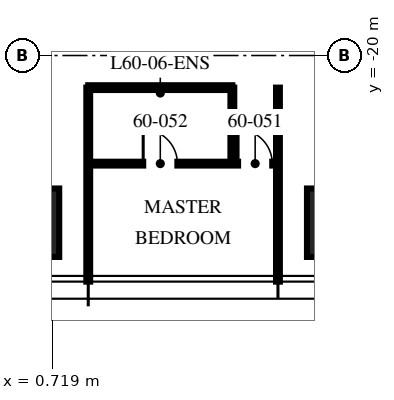
"""IFC4 building model, lengths in metres.
Left out: names, types, materials, properties, quantities, classifications, styles, units other than length and angle.
Written with IfcOpenShell. Run it as: python <this file> out.ifc"""

import sys

from ifc_helpers import new_model, si_unit, direction, frame, frame_2d, origin, origin_2d, place, context, subcontext, project, spatial, rectangle, extrude, element, fill, save


model = new_model("IFC4")
c1 = context("Model", 3, precision=1e-05, world=origin(), true_north=direction((0.0, 1.0)))
c2 = subcontext(c1, "Body", "Model", "MODEL_VIEW")
j1 = project(units=[si_unit("LENGTHUNIT", "METRE"), si_unit("PLANEANGLEUNIT", "RADIAN")], contexts=[c1])
p1 = place(None, origin())
s1 = spatial("IfcSite", under=j1, at=p1, CompositionType="ELEMENT")
p2 = place(p1, origin())
s2 = spatial("IfcBuilding", under=s1, at=p2, CompositionType="ELEMENT")
p3 = place(p2, frame((0.0, 0.0, 240.75)))
s3 = spatial("IfcBuildingStorey", under=s2, at=p3, CompositionType="ELEMENT", Elevation=240.75)
for number, where, z_axis, x_axis in (
    (1, (8.32, -24.4, 0.0), (0.0, 0.0, 1.0), (1.0, 0.0, 0.0)),
    (2, (0.0, -24.4, 0.0), (0.0, 0.0, 1.0), (1.0, 0.0, 0.0)),
):
    element("IfcColumn", number, at=place(p3, frame(where, z_axis=z_axis, x_axis=x_axis)), inside=s3, PredefinedType="COLUMN", context=c2, shape_type="SweptSolid", body=[
        extrude(rectangle(XDim=1.8, YDim=1.8, at=origin_2d()), origin(), (0.0, 0.0, 1.0), 3.75),
    ])
for number, where, z_axis, x_axis in (
    (3, (1.664, -20.845, 0.0), (0.0, 0.0, 1.0), (0.0, -1.0, 0.0)),
    (4, (6.656, -20.845, 0.0), (0.0, 0.0, 1.0), (0.0, -1.0, 0.0)),
):
    element("IfcWall", number, at=place(p3, frame(where, z_axis=z_axis, x_axis=x_axis)), inside=s3, PredefinedType="PARTITIONING", context=c2, shape_type="SweptSolid", body=[
        extrude(rectangle(XDim=5.105, YDim=0.1, at=frame_2d((2.552, 0.0))), origin(), (0.0, 0.0, 1.0), 2.91),
    ])
p4 = place(p3, frame((1.664, -22.845, 0.0), z_axis=(0.0, 0.0, 1.0), x_axis=(1.0, 0.0, 0.0)))
e5 = element("IfcWall", 5, at=p4, inside=s3, PredefinedType="PARTITIONING", context=c2, shape_type="SweptSolid", body=[
    extrude(rectangle(XDim=4.992, YDim=0.1, at=frame_2d((2.496, 0.0))), origin(), (0.0, 0.0, 1.0), 2.81),
])
p5 = place(p4, frame((3.942, 0.0, 0.0)))
e6 = element("IfcOpeningElement", 6, at=p5, cuts=e5, PredefinedType="OPENING", context=c2, shape_type="SweptSolid", body=[
    extrude(rectangle(XDim=0.9, YDim=2.1, at=frame_2d((0.45, 1.05))), frame((0.0, 0.06, 0.0), z_axis=(0.0, -1.0, 0.0), x_axis=(1.0, 0.0, 0.0)), (0.0, 0.0, 1.0), 0.12),
])
p6 = place(p4, frame((1.446, 0.0, 0.0)))
e7 = element("IfcOpeningElement", 7, at=p6, cuts=e5, PredefinedType="OPENING", context=c2, shape_type="SweptSolid", body=[
    extrude(rectangle(XDim=0.9, YDim=2.1, at=frame_2d((0.45, 1.05))), frame((0.0, 0.06, 0.0), z_axis=(0.0, -1.0, 0.0), x_axis=(1.0, 0.0, 0.0)), (0.0, 0.0, 1.0), 0.12),
])
p7 = place(p3, frame((5.456, -20.845, 0.0), z_axis=(0.0, 0.0, 1.0), x_axis=(0.0, -1.0, 0.0)))
e8 = element("IfcWall", 8, at=p7, inside=s3, PredefinedType="PARTITIONING", context=c2, shape_type="SweptSolid", body=[
    extrude(rectangle(XDim=2.0, YDim=0.1, at=frame_2d((1.0, 0.0))), origin(), (0.0, 0.0, 1.0), 3.5),
])
p8 = place(p3, frame((1.664, -20.845, 0.0), z_axis=(0.0, 0.0, 1.0), x_axis=(1.0, 0.0, 0.0)))
e9 = element("IfcWall", 9, at=p8, inside=s3, PredefinedType="PARTITIONING", context=c2, shape_type="SweptSolid", body=[
    extrude(rectangle(XDim=3.792, YDim=0.125, at=frame_2d((1.896, 0.0))), origin(), (0.0, 0.0, 1.0), 2.81),
])
p9 = place(p5, origin())
e10 = element("IfcDoor", 10, at=p9, inside=s3, OperationType="SINGLE_SWING_LEFT", PredefinedType="DOOR", context=c2, shape_type="SweptSolid", body=[
    extrude(rectangle(XDim=0.9, YDim=2.1, at=frame_2d((0.45, 1.05))), frame((0.0, 0.025, 0.0), z_axis=(0.0, -1.0, 0.0), x_axis=(1.0, 0.0, 0.0)), (0.0, 0.0, 1.0), 0.05),
])
fill(e6, e10)
p10 = place(p6, origin())
e11 = element("IfcDoor", 11, at=p10, inside=s3, OperationType="SINGLE_SWING_LEFT", PredefinedType="DOOR", context=c2, shape_type="SweptSolid", body=[
    extrude(rectangle(XDim=0.9, YDim=2.1, at=frame_2d((0.45, 1.05))), frame((0.0, 0.025, 0.0), z_axis=(0.0, -1.0, 0.0), x_axis=(1.0, 0.0, 0.0)), (0.0, 0.0, 1.0), 0.05),
])
fill(e7, e11)
save(model, sys.argv[1])
